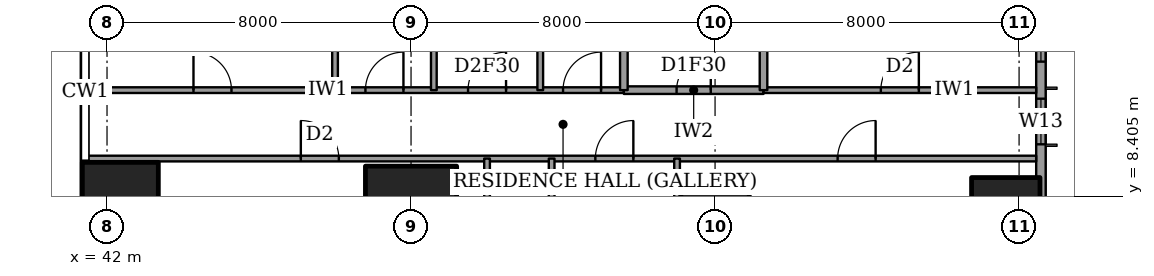
"""IFC4 building model, lengths in metres.
Left out: names, types, materials, properties, quantities, classifications, styles, units other than length and angle.
Written with IfcOpenShell. Run it as: python <this file> out.ifc"""

import sys

from ifc_helpers import new_model, si_unit, direction, frame, frame_2d, origin, origin_2d, place, context, subcontext, project, spatial, rectangle, extrude, element, fill, save


model = new_model("IFC4")
c1 = context("Model", 3, precision=1e-05, world=origin(), true_north=direction((0.0, 1.0)))
c2 = subcontext(c1, "Body", "Model", "MODEL_VIEW")
j1 = project(units=[si_unit("LENGTHUNIT", "METRE"), si_unit("PLANEANGLEUNIT", "RADIAN")], contexts=[c1])
p1 = place(None, origin())
s1 = spatial("IfcSite", under=j1, at=p1, CompositionType="ELEMENT")
p2 = place(p1, origin())
s2 = spatial("IfcBuilding", under=s1, at=p2, CompositionType="ELEMENT")
p3 = place(p2, frame((0.0, 0.0, 189.4)))
s3 = spatial("IfcBuildingStorey", under=s2, at=p3, CompositionType="ELEMENT", Elevation=189.4)
p4 = place(p3, frame((42.35, 8.0, 0.0), z_axis=(0.0, 0.0, 1.0), x_axis=(1.0, 0.0, 0.0)))
e1 = element("IfcColumn", 1, at=p4, inside=s3, PredefinedType="COLUMN", context=c2, shape_type="SweptSolid", body=[
    extrude(rectangle(XDim=2.0, YDim=2.6, at=origin_2d()), origin(), (0.0, 0.0, 1.0), 3.6),
])
p5 = place(p3, frame((50.0, 8.0, 0.0), z_axis=(0.0, 0.0, 1.0), x_axis=(1.0, 0.0, 0.0)))
e2 = element("IfcColumn", 2, at=p5, inside=s3, PredefinedType="COLUMN", context=c2, shape_type="SweptSolid", body=[
    extrude(rectangle(XDim=2.4, YDim=2.4, at=origin_2d()), origin(), (0.0, 0.0, 1.0), 3.6),
])
for number, where, z_axis, x_axis in (
    (3, (58.0, 8.0, 0.0), (0.0, 0.0, 1.0), (1.0, 0.0, 0.0)),
    (4, (65.65, 8.0, 0.0), (0.0, 0.0, 1.0), (1.0, 0.0, 0.0)),
):
    element("IfcColumn", number, at=place(p3, frame(where, z_axis=z_axis, x_axis=x_axis)), inside=s3, PredefinedType="COLUMN", context=c2, shape_type="SweptSolid", body=[
        extrude(rectangle(XDim=1.8, YDim=1.8, at=origin_2d()), origin(), (0.0, 0.0, 1.0), 3.6),
    ])
p6 = place(p3, frame((66.575, 3.175, 0.0), z_axis=(0.0, 0.0, 1.0), x_axis=(0.0, 1.0, 0.0)))
e5 = element("IfcWall", 5, at=p6, inside=s3, PredefinedType="SOLIDWALL", context=c2, shape_type="SweptSolid", body=[
    extrude(rectangle(XDim=41.65, YDim=0.25, at=frame_2d((20.825, 0.0))), origin(), (0.0, 0.0, 1.0), 3.6),
])
p7 = place(p6, frame((0.825, 0.0, 0.2)))
e6 = element("IfcOpeningElement", 6, at=p7, cuts=e5, PredefinedType="OPENING", context=c2, shape_type="SweptSolid", body=[
    extrude(rectangle(XDim=2.4, YDim=2.4, at=frame_2d((1.2, 1.2))), frame((0.0, 0.135, 0.0), z_axis=(0.0, -1.0, 0.0), x_axis=(1.0, 0.0, 0.0)), (0.0, 0.0, 1.0), 0.27),
])
p8 = place(p6, frame((6.6, 0.0, 0.2)))
e7 = element("IfcOpeningElement", 7, at=p8, cuts=e5, PredefinedType="OPENING", context=c2, shape_type="SweptSolid", body=[
    extrude(rectangle(XDim=1.2, YDim=2.4, at=frame_2d((0.6, 1.2))), frame((0.0, 0.135, 0.0), z_axis=(0.0, -1.0, 0.0), x_axis=(1.0, 0.0, 0.0)), (0.0, 0.0, 1.0), 0.27),
])
p9 = place(p6, frame((8.775, 0.0, 0.2)))
e8 = element("IfcOpeningElement", 8, at=p9, cuts=e5, PredefinedType="OPENING", context=c2, shape_type="SweptSolid", body=[
    extrude(rectangle(XDim=2.4, YDim=2.4, at=frame_2d((1.2, 1.2))), frame((0.0, 0.135, 0.0), z_axis=(0.0, -1.0, 0.0), x_axis=(1.0, 0.0, 0.0)), (0.0, 0.0, 1.0), 0.27),
])
p10 = place(p6, frame((15.675, 0.0, 0.2)))
e9 = element("IfcOpeningElement", 9, at=p10, cuts=e5, PredefinedType="OPENING", context=c2, shape_type="SweptSolid", body=[
    extrude(rectangle(XDim=2.4, YDim=2.4, at=frame_2d((1.2, 1.2))), frame((0.0, 0.135, 0.0), z_axis=(0.0, -1.0, 0.0), x_axis=(1.0, 0.0, 0.0)), (0.0, 0.0, 1.0), 0.27),
])
p11 = place(p6, frame((23.575, 0.0, 0.2)))
e10 = element("IfcOpeningElement", 10, at=p11, cuts=e5, PredefinedType="OPENING", context=c2, shape_type="SweptSolid", body=[
    extrude(rectangle(XDim=2.4, YDim=2.4, at=frame_2d((1.2, 1.2))), frame((0.0, 0.135, 0.0), z_axis=(0.0, -1.0, 0.0), x_axis=(1.0, 0.0, 0.0)), (0.0, 0.0, 1.0), 0.27),
])
p12 = place(p6, frame((30.775, 0.0, 0.2)))
e11 = element("IfcOpeningElement", 11, at=p12, cuts=e5, PredefinedType="OPENING", context=c2, shape_type="SweptSolid", body=[
    extrude(rectangle(XDim=2.4, YDim=2.4, at=frame_2d((1.2, 1.2))), frame((0.0, 0.135, 0.0), z_axis=(0.0, -1.0, 0.0), x_axis=(1.0, 0.0, 0.0)), (0.0, 0.0, 1.0), 0.27),
])
p13 = place(p6, frame((34.55, 0.0, 0.2)))
e12 = element("IfcOpeningElement", 12, at=p13, cuts=e5, PredefinedType="OPENING", context=c2, shape_type="SweptSolid", body=[
    extrude(rectangle(XDim=1.2, YDim=2.4, at=frame_2d((0.6, 1.2))), frame((0.0, 0.135, 0.0), z_axis=(0.0, -1.0, 0.0), x_axis=(1.0, 0.0, 0.0)), (0.0, 0.0, 1.0), 0.27),
])
p14 = place(p6, frame((38.425, 0.0, 0.2)))
e13 = element("IfcOpeningElement", 13, at=p14, cuts=e5, PredefinedType="OPENING", context=c2, shape_type="SweptSolid", body=[
    extrude(rectangle(XDim=2.4, YDim=2.4, at=frame_2d((1.2, 1.2))), frame((0.0, 0.135, 0.0), z_axis=(0.0, -1.0, 0.0), x_axis=(1.0, 0.0, 0.0)), (0.0, 0.0, 1.0), 0.27),
])
p15 = place(p3, frame((41.439, 9.4, 0.0), z_axis=(0.0, 0.0, 1.0), x_axis=(1.0, 0.0, 0.0)))
e14 = element("IfcWall", 14, at=p15, inside=s3, PredefinedType="PARTITIONING", context=c2, shape_type="SweptSolid", body=[
    extrude(rectangle(XDim=25.011, YDim=0.15, at=frame_2d((12.505, 0.0))), origin(), (0.0, 0.0, 1.0), 3.35),
])
p16 = place(p15, frame((19.786, 0.0, 0.0)))
e15 = element("IfcOpeningElement", 15, at=p16, cuts=e14, PredefinedType="OPENING", context=c2, shape_type="SweptSolid", body=[
    extrude(rectangle(XDim=1.0, YDim=2.1, at=frame_2d((0.5, 1.05))), frame((0.0, 0.085, 0.0), z_axis=(0.0, -1.0, 0.0), x_axis=(1.0, 0.0, 0.0)), (0.0, 0.0, 1.0), 0.17),
])
p17 = place(p15, frame((13.411, 0.0, 0.0)))
e16 = element("IfcOpeningElement", 16, at=p17, cuts=e14, PredefinedType="OPENING", context=c2, shape_type="SweptSolid", body=[
    extrude(rectangle(XDim=1.0, YDim=2.1, at=frame_2d((0.5, 1.05))), frame((0.0, 0.085, 0.0), z_axis=(0.0, -1.0, 0.0), x_axis=(1.0, 0.0, 0.0)), (0.0, 0.0, 1.0), 0.17),
])
p18 = place(p15, frame((5.661, 0.0, 0.0)))
e17 = element("IfcOpeningElement", 17, at=p18, cuts=e14, PredefinedType="OPENING", context=c2, shape_type="SweptSolid", body=[
    extrude(rectangle(XDim=1.0, YDim=2.1, at=frame_2d((0.5, 1.05))), frame((0.0, 0.085, 0.0), z_axis=(0.0, -1.0, 0.0), x_axis=(1.0, 0.0, 0.0)), (0.0, 0.0, 1.0), 0.17),
])
p19 = place(p3, frame((55.6, 11.2, 0.0), z_axis=(0.0, 0.0, 1.0), x_axis=(1.0, 0.0, 0.0)))
e18 = element("IfcWall", 18, at=p19, inside=s3, PredefinedType="PARTITIONING", context=c2, shape_type="SweptSolid", body=[
    extrude(rectangle(XDim=3.675, YDim=0.2, at=frame_2d((1.837, 0.0))), origin(), (0.0, 0.0, 1.0), 3.35),
])
p20 = place(p19, frame((1.387, 0.0, 0.0)))
e19 = element("IfcOpeningElement", 19, at=p20, cuts=e18, PredefinedType="OPENING", context=c2, shape_type="SweptSolid", body=[
    extrude(rectangle(XDim=0.9, YDim=2.1, at=frame_2d((0.45, 1.05))), frame((0.0, 0.11, 0.0), z_axis=(0.0, -1.0, 0.0), x_axis=(1.0, 0.0, 0.0)), (0.0, 0.0, 1.0), 0.22),
])
p21 = place(p3, frame((41.439, 11.2, 0.0), z_axis=(0.0, 0.0, 1.0), x_axis=(1.0, 0.0, 0.0)))
e20 = element("IfcWall", 20, at=p21, inside=s3, PredefinedType="PARTITIONING", context=c2, shape_type="SweptSolid", body=[
    extrude(rectangle(XDim=14.161, YDim=0.15, at=frame_2d((7.081, 0.0))), origin(), (0.0, 0.0, 1.0), 3.35),
])
p22 = place(p21, frame((12.561, 0.0, 0.0)))
e21 = element("IfcOpeningElement", 21, at=p22, cuts=e20, PredefinedType="OPENING", context=c2, shape_type="SweptSolid", body=[
    extrude(rectangle(XDim=1.0, YDim=2.1, at=frame_2d((0.5, 1.05))), frame((0.0, 0.085, 0.0), z_axis=(0.0, -1.0, 0.0), x_axis=(1.0, 0.0, 0.0)), (0.0, 0.0, 1.0), 0.17),
])
p23 = place(p21, frame((10.061, 0.0, 0.0)))
e22 = element("IfcOpeningElement", 22, at=p23, cuts=e20, PredefinedType="OPENING", context=c2, shape_type="SweptSolid", body=[
    extrude(rectangle(XDim=1.0, YDim=2.1, at=frame_2d((0.5, 1.05))), frame((0.0, 0.085, 0.0), z_axis=(0.0, -1.0, 0.0), x_axis=(1.0, 0.0, 0.0)), (0.0, 0.0, 1.0), 0.17),
])
p24 = place(p21, frame((7.361, 0.0, 0.0)))
e23 = element("IfcOpeningElement", 23, at=p24, cuts=e20, PredefinedType="OPENING", context=c2, shape_type="SweptSolid", body=[
    extrude(rectangle(XDim=1.0, YDim=2.1, at=frame_2d((0.5, 1.05))), frame((0.0, 0.085, 0.0), z_axis=(0.0, -1.0, 0.0), x_axis=(1.0, 0.0, 0.0)), (0.0, 0.0, 1.0), 0.17),
])
p25 = place(p21, frame((2.836, 0.0, 0.0)))
e24 = element("IfcOpeningElement", 24, at=p25, cuts=e20, PredefinedType="OPENING", context=c2, shape_type="SweptSolid", body=[
    extrude(rectangle(XDim=1.0, YDim=2.1, at=frame_2d((0.5, 1.05))), frame((0.0, 0.085, 0.0), z_axis=(0.0, -1.0, 0.0), x_axis=(1.0, 0.0, 0.0)), (0.0, 0.0, 1.0), 0.17),
])
p26 = place(p3, frame((59.275, 11.2, 0.0), z_axis=(0.0, 0.0, 1.0), x_axis=(1.0, 0.0, 0.0)))
e25 = element("IfcWall", 25, at=p26, inside=s3, PredefinedType="PARTITIONING", context=c2, shape_type="SweptSolid", body=[
    extrude(rectangle(XDim=7.175, YDim=0.15, at=frame_2d((3.587, 0.0))), origin(), (0.0, 0.0, 1.0), 3.35),
])
p27 = place(p26, frame((3.087, 0.0, 0.0)))
e26 = element("IfcOpeningElement", 26, at=p27, cuts=e25, PredefinedType="OPENING", context=c2, shape_type="SweptSolid", body=[
    extrude(rectangle(XDim=1.0, YDim=2.1, at=frame_2d((0.5, 1.05))), frame((0.0, 0.085, 0.0), z_axis=(0.0, -1.0, 0.0), x_axis=(1.0, 0.0, 0.0)), (0.0, 0.0, 1.0), 0.17),
])
p28 = place(p3, frame((48.0, 11.2, 0.0), z_axis=(0.0, 0.0, 1.0), x_axis=(0.0, 1.0, 0.0)))
e27 = element("IfcWall", 27, at=p28, inside=s3, PredefinedType="PARTITIONING", context=c2, shape_type="SweptSolid", body=[
    extrude(rectangle(XDim=6.8, YDim=0.15, at=frame_2d((3.4, 0.0))), origin(), (0.0, 0.0, 1.0), 3.35),
])
p29 = place(p3, frame((50.6, 11.2, 0.0), z_axis=(0.0, 0.0, 1.0), x_axis=(0.0, 1.0, 0.0)))
e28 = element("IfcWall", 28, at=p29, inside=s3, PredefinedType="PARTITIONING", context=c2, shape_type="SweptSolid", body=[
    extrude(rectangle(XDim=3.6, YDim=0.15, at=frame_2d((1.8, 0.0))), origin(), (0.0, 0.0, 1.0), 3.35),
])
p30 = place(p3, frame((52.0, -0.45, 0.0), z_axis=(0.0, 0.0, 1.0), x_axis=(0.0, 1.0, 0.0)))
e29 = element("IfcWall", 29, at=p30, inside=s3, PredefinedType="PARTITIONING", context=c2, shape_type="SweptSolid", body=[
    extrude(rectangle(XDim=9.85, YDim=0.15, at=frame_2d((4.925, 0.0))), origin(), (0.0, 0.0, 1.0), 3.35),
])
p31 = place(p3, frame((53.4, 11.2, 0.0), z_axis=(0.0, 0.0, 1.0), x_axis=(0.0, 1.0, 0.0)))
e30 = element("IfcWall", 30, at=p31, inside=s3, PredefinedType="PARTITIONING", context=c2, shape_type="SweptSolid", body=[
    extrude(rectangle(XDim=6.8, YDim=0.15, at=frame_2d((3.4, 0.0))), origin(), (0.0, 0.0, 1.0), 3.35),
])
p32 = place(p3, frame((53.7, -0.45, 0.0), z_axis=(0.0, 0.0, 1.0), x_axis=(0.0, 1.0, 0.0)))
e31 = element("IfcWall", 31, at=p32, inside=s3, PredefinedType="PARTITIONING", context=c2, shape_type="SweptSolid", body=[
    extrude(rectangle(XDim=9.85, YDim=0.15, at=frame_2d((4.925, 0.0))), origin(), (0.0, 0.0, 1.0), 3.35),
])
p33 = place(p32, frame((4.475, 0.0, 0.0)))
e32 = element("IfcOpeningElement", 32, at=p33, cuts=e31, PredefinedType="OPENING", context=c2, shape_type="SweptSolid", body=[
    extrude(rectangle(XDim=0.9, YDim=2.1, at=frame_2d((0.45, 1.05))), frame((0.0, 0.085, 0.0), z_axis=(0.0, -1.0, 0.0), x_axis=(1.0, 0.0, 0.0)), (0.0, 0.0, 1.0), 0.17),
])
p34 = place(p3, frame((55.6, 11.2, 0.0), z_axis=(0.0, 0.0, 1.0), x_axis=(0.0, 1.0, 0.0)))
e33 = element("IfcWall", 33, at=p34, inside=s3, PredefinedType="PARTITIONING", context=c2, shape_type="SweptSolid", body=[
    extrude(rectangle(XDim=3.4, YDim=0.2, at=frame_2d((1.7, 0.0))), origin(), (0.0, 0.0, 1.0), 3.35),
])
p35 = place(p3, frame((57.0, -0.45, 0.0), z_axis=(0.0, 0.0, 1.0), x_axis=(0.0, 1.0, 0.0)))
e34 = element("IfcWall", 34, at=p35, inside=s3, PredefinedType="PARTITIONING", context=c2, shape_type="SweptSolid", body=[
    extrude(rectangle(XDim=9.85, YDim=0.15, at=frame_2d((4.925, 0.0))), origin(), (0.0, 0.0, 1.0), 3.35),
])
p36 = place(p3, frame((59.275, 11.2, 0.0), z_axis=(0.0, 0.0, 1.0), x_axis=(0.0, 1.0, 0.0)))
e35 = element("IfcWall", 35, at=p36, inside=s3, PredefinedType="PARTITIONING", context=c2, shape_type="SweptSolid", body=[
    extrude(rectangle(XDim=3.4, YDim=0.2, at=frame_2d((1.7, 0.0))), origin(), (0.0, 0.0, 1.0), 3.35),
])
p37 = place(p8, origin())
e36 = element("IfcWindow", 36, at=p37, inside=s3, PartitioningType="SINGLE_PANEL", PredefinedType="WINDOW", context=c2, shape_type="SweptSolid", body=[
    extrude(rectangle(XDim=1.2, YDim=2.4, at=frame_2d((0.6, 1.2))), frame((0.0, 0.03, 0.0), z_axis=(0.0, -1.0, 0.0), x_axis=(1.0, 0.0, 0.0)), (0.0, 0.0, 1.0), 0.06),
])
fill(e7, e36)
p38 = place(p9, origin())
e37 = element("IfcWindow", 37, at=p38, inside=s3, PartitioningType="SINGLE_PANEL", PredefinedType="WINDOW", context=c2, shape_type="SweptSolid", body=[
    extrude(rectangle(XDim=2.4, YDim=2.4, at=frame_2d((1.2, 1.2))), frame((0.0, 0.03, 0.0), z_axis=(0.0, -1.0, 0.0), x_axis=(1.0, 0.0, 0.0)), (0.0, 0.0, 1.0), 0.06),
])
fill(e8, e37)
p39 = place(p16, origin())
e38 = element("IfcDoor", 38, at=p39, inside=s3, OperationType="SINGLE_SWING_LEFT", PredefinedType="DOOR", context=c2, shape_type="SweptSolid", body=[
    extrude(rectangle(XDim=1.0, YDim=2.1, at=frame_2d((0.5, 1.05))), frame((0.0, 0.025, 0.0), z_axis=(0.0, -1.0, 0.0), x_axis=(1.0, 0.0, 0.0)), (0.0, 0.0, 1.0), 0.05),
])
fill(e15, e38)
p40 = place(p17, origin())
e39 = element("IfcDoor", 39, at=p40, inside=s3, OperationType="SINGLE_SWING_LEFT", PredefinedType="DOOR", context=c2, shape_type="SweptSolid", body=[
    extrude(rectangle(XDim=1.0, YDim=2.1, at=frame_2d((0.5, 1.05))), frame((0.0, 0.025, 0.0), z_axis=(0.0, -1.0, 0.0), x_axis=(1.0, 0.0, 0.0)), (0.0, 0.0, 1.0), 0.05),
])
fill(e16, e39)
p41 = place(p18, origin())
e40 = element("IfcDoor", 40, at=p41, inside=s3, OperationType="SINGLE_SWING_RIGHT", PredefinedType="DOOR", context=c2, shape_type="SweptSolid", body=[
    extrude(rectangle(XDim=1.0, YDim=2.1, at=frame_2d((0.5, 1.05))), frame((0.0, 0.025, 0.0), z_axis=(0.0, -1.0, 0.0), x_axis=(1.0, 0.0, 0.0)), (0.0, 0.0, 1.0), 0.05),
])
fill(e17, e40)
p42 = place(p22, origin())
e41 = element("IfcDoor", 41, at=p42, inside=s3, OperationType="SINGLE_SWING_LEFT", PredefinedType="DOOR", context=c2, shape_type="SweptSolid", body=[
    extrude(rectangle(XDim=1.0, YDim=2.1, at=frame_2d((0.5, 1.05))), frame((0.0, 0.025, 0.0), z_axis=(0.0, -1.0, 0.0), x_axis=(1.0, 0.0, 0.0)), (0.0, 0.0, 1.0), 0.05),
])
fill(e21, e41)
p43 = place(p27, origin())
e42 = element("IfcDoor", 42, at=p43, inside=s3, OperationType="SINGLE_SWING_LEFT", PredefinedType="DOOR", context=c2, shape_type="SweptSolid", body=[
    extrude(rectangle(XDim=1.0, YDim=2.1, at=frame_2d((0.5, 1.05))), frame((0.0, 0.025, 0.0), z_axis=(0.0, -1.0, 0.0), x_axis=(1.0, 0.0, 0.0)), (0.0, 0.0, 1.0), 0.05),
])
fill(e26, e42)
p44 = place(p20, origin())
e43 = element("IfcDoor", 43, at=p44, inside=s3, OperationType="SINGLE_SWING_LEFT", PredefinedType="DOOR", context=c2, shape_type="SweptSolid", body=[
    extrude(rectangle(XDim=0.9, YDim=2.1, at=frame_2d((0.45, 1.05))), frame((0.0, 0.025, 0.0), z_axis=(0.0, -1.0, 0.0), x_axis=(1.0, 0.0, 0.0)), (0.0, 0.0, 1.0), 0.05),
])
fill(e19, e43)
p45 = place(p23, origin())
e44 = element("IfcDoor", 44, at=p45, inside=s3, OperationType="SINGLE_SWING_LEFT", PredefinedType="DOOR", context=c2, shape_type="SweptSolid", body=[
    extrude(rectangle(XDim=1.0, YDim=2.1, at=frame_2d((0.5, 1.05))), frame((0.0, 0.025, 0.0), z_axis=(0.0, -1.0, 0.0), x_axis=(1.0, 0.0, 0.0)), (0.0, 0.0, 1.0), 0.05),
])
fill(e22, e44)
p46 = place(p24, origin())
e45 = element("IfcDoor", 45, at=p46, inside=s3, OperationType="SINGLE_SWING_LEFT", PredefinedType="DOOR", context=c2, shape_type="SweptSolid", body=[
    extrude(rectangle(XDim=1.0, YDim=2.1, at=frame_2d((0.5, 1.05))), frame((0.0, 0.025, 0.0), z_axis=(0.0, -1.0, 0.0), x_axis=(1.0, 0.0, 0.0)), (0.0, 0.0, 1.0), 0.05),
])
fill(e23, e45)
p47 = place(p25, origin())
e46 = element("IfcDoor", 46, at=p47, inside=s3, OperationType="SINGLE_SWING_RIGHT", PredefinedType="DOOR", context=c2, shape_type="SweptSolid", body=[
    extrude(rectangle(XDim=1.0, YDim=2.1, at=frame_2d((0.5, 1.05))), frame((0.0, 0.025, 0.0), z_axis=(0.0, -1.0, 0.0), x_axis=(1.0, 0.0, 0.0)), (0.0, 0.0, 1.0), 0.05),
])
fill(e24, e46)
save(model, sys.argv[1])
